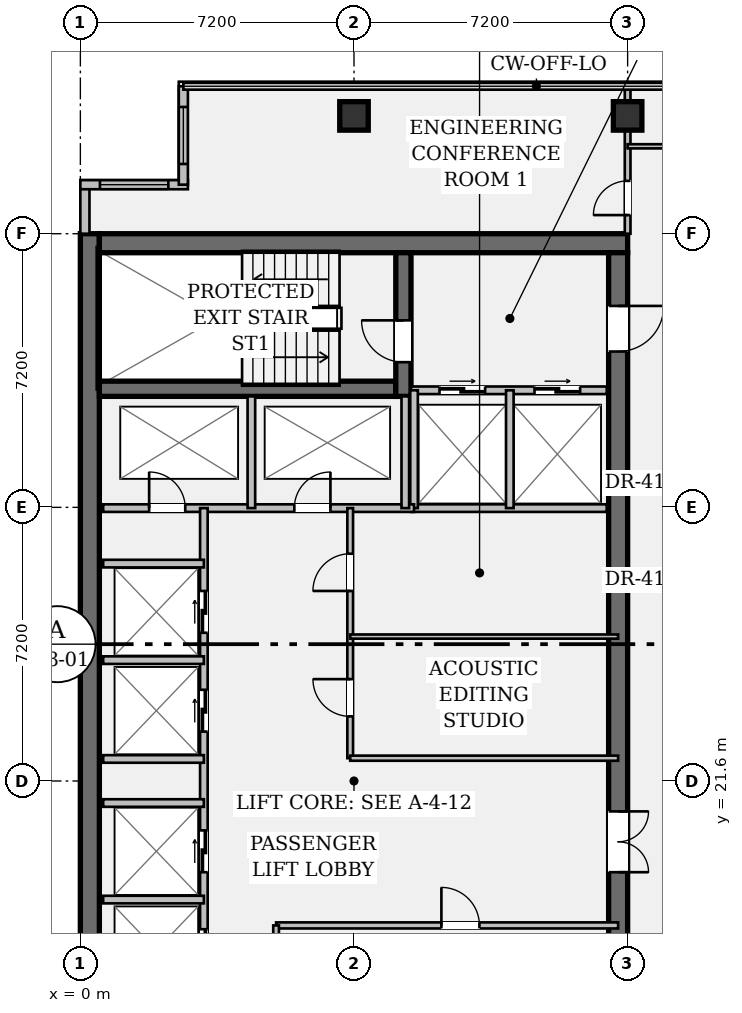
"""IFC4 building model, lengths in metres.
Left out: names, types, materials, properties, quantities, classifications, styles, units other than length and angle.
Written with IfcOpenShell. Run it as: python <this file> out.ifc"""

import sys

from ifc_helpers import new_model, si_unit, direction, frame, frame_2d, origin, origin_2d, place, context, subcontext, project, spatial, rectangle, hollow_rectangle, extrude, element, fill, save


model = new_model("IFC4")
c1 = context("Model", 3, precision=1e-05, world=origin(), true_north=direction((0.0, 1.0)))
c2 = subcontext(c1, "Body", "Model", "MODEL_VIEW")
j1 = project(units=[si_unit("LENGTHUNIT", "METRE"), si_unit("PLANEANGLEUNIT", "RADIAN")], contexts=[c1])
p1 = place(None, origin())
s1 = spatial("IfcSite", under=j1, at=p1, CompositionType="ELEMENT")
p2 = place(p1, origin())
s2 = spatial("IfcBuilding", under=s1, at=p2, CompositionType="ELEMENT")
p3 = place(p2, frame((0.0, 0.0, 204.75)))
s3 = spatial("IfcBuildingStorey", under=s2, at=p3, CompositionType="ELEMENT", Elevation=204.75)
p4 = place(p3, frame((0.25, 7.2, 0.0), z_axis=(0.0, 0.0, 1.0), x_axis=(0.0, 1.0, 0.0)))
e1 = element("IfcWall", 1, at=p4, inside=s3, PredefinedType="SHEAR", context=c2, shape_type="SweptSolid", body=[
    extrude(rectangle(XDim=28.8, YDim=0.5, at=frame_2d((14.4, 0.0))), origin(), (0.0, 0.0, 1.0), 3.24),
])
p5 = place(p3, frame((0.5, 35.75, 0.0), z_axis=(0.0, 0.0, 1.0), x_axis=(1.0, 0.0, 0.0)))
e2 = element("IfcWall", 2, at=p5, inside=s3, PredefinedType="SHEAR", context=c2, shape_type="SweptSolid", body=[
    extrude(rectangle(XDim=13.9, YDim=0.5, at=frame_2d((6.95, 0.0))), origin(), (0.0, 0.0, 1.0), 3.24),
])
p6 = place(p3, frame((14.15, 35.5, 0.0), z_axis=(0.0, 0.0, 1.0), x_axis=(0.0, -1.0, 0.0)))
e3 = element("IfcWall", 3, at=p6, inside=s3, PredefinedType="SHEAR", context=c2, shape_type="SweptSolid", body=[
    extrude(rectangle(XDim=27.8, YDim=0.5, at=frame_2d((13.9, 0.0))), origin(), (0.0, 0.0, 1.0), 3.24),
])
p7 = place(p6, frame((1.4, 0.0, 0.0)))
e4 = element("IfcOpeningElement", 4, at=p7, cuts=e3, PredefinedType="OPENING", context=c2, shape_type="SweptSolid", body=[
    extrude(rectangle(XDim=1.2, YDim=2.15, at=frame_2d((0.6, 1.075))), frame((0.0, 0.262, 0.0), z_axis=(0.0, -1.0, 0.0), x_axis=(1.0, 0.0, 0.0)), (0.0, 0.0, 1.0), 0.524),
])
p8 = place(p6, frame((25.35, 0.0, 0.0)))
e5 = element("IfcOpeningElement", 5, at=p8, cuts=e3, PredefinedType="OPENING", context=c2, shape_type="SweptSolid", body=[
    extrude(rectangle(XDim=1.2, YDim=2.15, at=frame_2d((0.6, 1.075))), frame((0.0, 0.262, 0.0), z_axis=(0.0, -1.0, 0.0), x_axis=(1.0, 0.0, 0.0)), (0.0, 0.0, 1.0), 0.524),
])
p9 = place(p6, frame((14.7, 0.0, 0.0)))
e6 = element("IfcOpeningElement", 6, at=p9, cuts=e3, PredefinedType="OPENING", context=c2, shape_type="SweptSolid", body=[
    extrude(rectangle(XDim=1.6, YDim=2.2, at=frame_2d((0.8, 1.1))), frame((0.0, 0.262, 0.0), z_axis=(0.0, -1.0, 0.0), x_axis=(1.0, 0.0, 0.0)), (0.0, 0.0, 1.0), 0.524),
])
p10 = place(p3, frame((0.5, 31.92, 0.0), z_axis=(0.0, 0.0, 1.0), x_axis=(1.0, 0.0, 0.0)))
e7 = element("IfcWall", 7, at=p10, inside=s3, PredefinedType="SHEAR", context=c2, shape_type="SweptSolid", body=[
    extrude(rectangle(XDim=7.8, YDim=0.4, at=frame_2d((3.9, 0.0))), origin(), (0.0, 0.0, 1.0), 3.24),
])
p11 = place(p3, frame((8.5, 31.72, 0.0), z_axis=(0.0, 0.0, 1.0), x_axis=(0.0, 1.0, 0.0)))
e8 = element("IfcWall", 8, at=p11, inside=s3, PredefinedType="SHEAR", context=c2, shape_type="SweptSolid", body=[
    extrude(rectangle(XDim=3.78, YDim=0.4, at=frame_2d((1.89, 0.0))), origin(), (0.0, 0.0, 1.0), 3.24),
])
p12 = place(p11, frame((0.9, 0.0, 0.0)))
e9 = element("IfcOpeningElement", 9, at=p12, cuts=e8, PredefinedType="OPENING", context=c2, shape_type="SweptSolid", body=[
    extrude(rectangle(XDim=1.1, YDim=2.15, at=frame_2d((0.55, 1.075))), frame((0.0, 0.212, 0.0), z_axis=(0.0, -1.0, 0.0), x_axis=(1.0, 0.0, 0.0)), (0.0, 0.0, 1.0), 0.424),
])
for number, where, z_axis, x_axis in (
    (10, (7.2, 39.1, 0.0), (0.0, 0.0, 1.0), (1.0, 0.0, 0.0)),
    (11, (14.4, 39.1, 0.0), (0.0, 0.0, 1.0), (1.0, 0.0, 0.0)),
):
    element("IfcColumn", number, at=place(p3, frame(where, z_axis=z_axis, x_axis=x_axis)), inside=s3, PredefinedType="COLUMN", context=c2, shape_type="SweptSolid", body=[
        extrude(hollow_rectangle(XDim=0.75, YDim=0.75, WallThickness=0.045, at=origin_2d()), origin(), (0.0, 0.0, 1.0), 3.24),
    ])
p13 = place(p3, frame((0.12, 36.0, 0.0), z_axis=(0.0, 0.0, 1.0), x_axis=(0.0, 1.0, 0.0)))
e12 = element("IfcWall", 12, at=p13, inside=s3, PredefinedType="STANDARD", context=c2, shape_type="SweptSolid", body=[
    extrude(rectangle(XDim=1.29, YDim=0.24, at=frame_2d((0.645, 0.0))), origin(), (0.0, 0.0, 1.0), 3.24),
])
p14 = place(p3, frame((0.0, 37.29, 0.0), z_axis=(0.0, 0.0, 1.0), x_axis=(1.0, 0.0, 0.0)))
e13 = element("IfcWall", 13, at=p14, inside=s3, PredefinedType="STANDARD", context=c2, shape_type="SweptSolid", body=[
    extrude(rectangle(XDim=2.83, YDim=0.24, at=frame_2d((1.415, 0.0))), origin(), (0.0, 0.0, 1.0), 3.24),
])
p15 = place(p14, frame((0.515, 0.0, 0.95)))
e14 = element("IfcOpeningElement", 14, at=p15, cuts=e13, PredefinedType="OPENING", context=c2, shape_type="SweptSolid", body=[
    extrude(rectangle(XDim=1.8, YDim=1.35, at=frame_2d((0.9, 0.675))), frame((0.0, 0.132, 0.0), z_axis=(0.0, -1.0, 0.0), x_axis=(1.0, 0.0, 0.0)), (0.0, 0.0, 1.0), 0.264),
])
p16 = place(p3, frame((2.71, 37.29, 0.0), z_axis=(0.0, 0.0, 1.0), x_axis=(0.0, 1.0, 0.0)))
e15 = element("IfcWall", 15, at=p16, inside=s3, PredefinedType="STANDARD", context=c2, shape_type="SweptSolid", body=[
    extrude(rectangle(XDim=2.59, YDim=0.24, at=frame_2d((1.295, 0.0))), origin(), (0.0, 0.0, 1.0), 3.24),
])
p17 = place(p16, frame((0.545, 0.0, 0.95)))
e16 = element("IfcOpeningElement", 16, at=p17, cuts=e15, PredefinedType="OPENING", context=c2, shape_type="SweptSolid", body=[
    extrude(rectangle(XDim=1.5, YDim=1.8, at=frame_2d((0.75, 0.9))), frame((0.0, 0.132, 0.0), z_axis=(0.0, -1.0, 0.0), x_axis=(1.0, 0.0, 0.0)), (0.0, 0.0, 1.0), 0.264),
])
p18 = place(p3, frame((8.7, 31.88, 0.0), z_axis=(0.0, 0.0, 1.0), x_axis=(1.0, 0.0, 0.0)))
e17 = element("IfcWall", 17, at=p18, inside=s3, PredefinedType="PARTITIONING", context=c2, shape_type="SweptSolid", body=[
    extrude(rectangle(XDim=5.15, YDim=0.2, at=frame_2d((2.575, 0.0))), origin(), (0.0, 0.0, 1.0), 3.24),
])
p19 = place(p18, frame((0.75, 0.0, 0.0)))
e18 = element("IfcOpeningElement", 18, at=p19, cuts=e17, PredefinedType="OPENING", context=c2, shape_type="SweptSolid", body=[
    extrude(rectangle(XDim=1.2, YDim=2.2, at=frame_2d((0.6, 1.1))), frame((0.0, 0.112, 0.0), z_axis=(0.0, -1.0, 0.0), x_axis=(1.0, 0.0, 0.0)), (0.0, 0.0, 1.0), 0.224),
])
p20 = place(p18, frame((3.25, 0.0, 0.0)))
e19 = element("IfcOpeningElement", 19, at=p20, cuts=e17, PredefinedType="OPENING", context=c2, shape_type="SweptSolid", body=[
    extrude(rectangle(XDim=1.2, YDim=2.2, at=frame_2d((0.6, 1.1))), frame((0.0, 0.112, 0.0), z_axis=(0.0, -1.0, 0.0), x_axis=(1.0, 0.0, 0.0)), (0.0, 0.0, 1.0), 0.224),
])
p21 = place(p3, frame((8.7, 28.78, 0.0), z_axis=(0.0, 0.0, 1.0), x_axis=(1.0, 0.0, 0.0)))
e20 = element("IfcWall", 20, at=p21, inside=s3, PredefinedType="PARTITIONING", context=c2, shape_type="SweptSolid", body=[
    extrude(rectangle(XDim=5.15, YDim=0.2, at=frame_2d((2.575, 0.0))), origin(), (0.0, 0.0, 1.0), 3.24),
])
for number, where, z_axis, x_axis in (
    (21, (8.78, 28.78, 0.0), (0.0, 0.0, 1.0), (0.0, 1.0, 0.0)),
    (22, (11.3, 28.78, 0.0), (0.0, 0.0, 1.0), (0.0, 1.0, 0.0)),
):
    element("IfcWall", number, at=place(p3, frame(where, z_axis=z_axis, x_axis=x_axis)), inside=s3, PredefinedType="PARTITIONING", context=c2, shape_type="SweptSolid", body=[
        extrude(rectangle(XDim=3.1, YDim=0.2, at=frame_2d((1.55, 0.0))), origin(), (0.0, 0.0, 1.0), 3.24),
    ])
p22 = place(p3, frame((0.6, 28.78, 0.0), z_axis=(0.0, 0.0, 1.0), x_axis=(1.0, 0.0, 0.0)))
e23 = element("IfcWall", 23, at=p22, inside=s3, PredefinedType="PARTITIONING", context=c2, shape_type="SweptSolid", body=[
    extrude(rectangle(XDim=8.18, YDim=0.2, at=frame_2d((4.09, 0.0))), origin(), (0.0, 0.0, 1.0), 3.24),
])
p23 = place(p22, frame((1.21, 0.0, 0.0)))
e24 = element("IfcOpeningElement", 24, at=p23, cuts=e23, PredefinedType="OPENING", context=c2, shape_type="SweptSolid", body=[
    extrude(rectangle(XDim=0.95, YDim=2.15, at=frame_2d((0.475, 1.075))), frame((0.0, 0.112, 0.0), z_axis=(0.0, -1.0, 0.0), x_axis=(1.0, 0.0, 0.0)), (0.0, 0.0, 1.0), 0.224),
])
p24 = place(p22, frame((5.03, 0.0, 0.0)))
e25 = element("IfcOpeningElement", 25, at=p24, cuts=e23, PredefinedType="OPENING", context=c2, shape_type="SweptSolid", body=[
    extrude(rectangle(XDim=0.95, YDim=2.15, at=frame_2d((0.475, 1.075))), frame((0.0, 0.112, 0.0), z_axis=(0.0, -1.0, 0.0), x_axis=(1.0, 0.0, 0.0)), (0.0, 0.0, 1.0), 0.224),
])
for number, where, z_axis, x_axis in (
    (26, (4.5, 28.78, 0.0), (0.0, 0.0, 1.0), (0.0, 1.0, 0.0)),
    (27, (8.55, 28.78, 0.0), (0.0, 0.0, 1.0), (0.0, 1.0, 0.0)),
):
    element("IfcWall", number, at=place(p3, frame(where, z_axis=z_axis, x_axis=x_axis)), inside=s3, PredefinedType="PARTITIONING", context=c2, shape_type="SweptSolid", body=[
        extrude(rectangle(XDim=2.94, YDim=0.2, at=frame_2d((1.47, 0.0))), origin(), (0.0, 0.0, 1.0), 3.24),
    ])
p25 = place(p3, frame((3.25, 15.7, 0.0), z_axis=(0.0, 0.0, 1.0), x_axis=(0.0, 1.0, 0.0)))
e28 = element("IfcWall", 28, at=p25, inside=s3, PredefinedType="PARTITIONING", context=c2, shape_type="SweptSolid", body=[
    extrude(rectangle(XDim=13.08, YDim=0.2, at=frame_2d((6.54, 0.0))), origin(), (0.0, 0.0, 1.0), 3.24),
])
p26 = place(p25, frame((0.9, 0.0, 0.0)))
e29 = element("IfcOpeningElement", 29, at=p26, cuts=e28, PredefinedType="OPENING", context=c2, shape_type="SweptSolid", body=[
    extrude(rectangle(XDim=1.1, YDim=2.2, at=frame_2d((0.55, 1.1))), frame((0.0, 0.112, 0.0), z_axis=(0.0, -1.0, 0.0), x_axis=(1.0, 0.0, 0.0)), (0.0, 0.0, 1.0), 0.224),
])
p27 = place(p25, frame((3.5, 0.0, 0.0)))
e30 = element("IfcOpeningElement", 30, at=p27, cuts=e28, PredefinedType="OPENING", context=c2, shape_type="SweptSolid", body=[
    extrude(rectangle(XDim=1.1, YDim=2.2, at=frame_2d((0.55, 1.1))), frame((0.0, 0.112, 0.0), z_axis=(0.0, -1.0, 0.0), x_axis=(1.0, 0.0, 0.0)), (0.0, 0.0, 1.0), 0.224),
])
p28 = place(p25, frame((7.2, 0.0, 0.0)))
e31 = element("IfcOpeningElement", 31, at=p28, cuts=e28, PredefinedType="OPENING", context=c2, shape_type="SweptSolid", body=[
    extrude(rectangle(XDim=1.1, YDim=2.2, at=frame_2d((0.55, 1.1))), frame((0.0, 0.112, 0.0), z_axis=(0.0, -1.0, 0.0), x_axis=(1.0, 0.0, 0.0)), (0.0, 0.0, 1.0), 0.224),
])
p29 = place(p25, frame((9.8, 0.0, 0.0)))
e32 = element("IfcOpeningElement", 32, at=p29, cuts=e28, PredefinedType="OPENING", context=c2, shape_type="SweptSolid", body=[
    extrude(rectangle(XDim=1.1, YDim=2.2, at=frame_2d((0.55, 1.1))), frame((0.0, 0.112, 0.0), z_axis=(0.0, -1.0, 0.0), x_axis=(1.0, 0.0, 0.0)), (0.0, 0.0, 1.0), 0.224),
])
for number, where, z_axis, x_axis in (
    (33, (0.6, 18.48, 0.0), (0.0, 0.0, 1.0), (1.0, 0.0, 0.0)),
    (34, (0.6, 22.18, 0.0), (0.0, 0.0, 1.0), (1.0, 0.0, 0.0)),
    (35, (0.6, 24.78, 0.0), (0.0, 0.0, 1.0), (1.0, 0.0, 0.0)),
    (36, (0.6, 21.02, 0.0), (0.0, 0.0, 1.0), (1.0, 0.0, 0.0)),
    (37, (0.6, 27.32, 0.0), (0.0, 0.0, 1.0), (1.0, 0.0, 0.0)),
):
    element("IfcWall", number, at=place(p3, frame(where, z_axis=z_axis, x_axis=x_axis)), inside=s3, PredefinedType="PARTITIONING", context=c2, shape_type="SweptSolid", body=[
        extrude(rectangle(XDim=2.65, YDim=0.2, at=frame_2d((1.325, 0.0))), origin(), (0.0, 0.0, 1.0), 3.24),
    ])
p30 = place(p3, frame((7.1, 22.2, 0.0), z_axis=(0.0, 0.0, 1.0), x_axis=(0.0, 1.0, 0.0)))
e38 = element("IfcWall", 38, at=p30, inside=s3, PredefinedType="PARTITIONING", context=c2, shape_type="SweptSolid", body=[
    extrude(rectangle(XDim=6.58, YDim=0.15, at=frame_2d((3.29, 0.0))), origin(), (0.0, 0.0, 1.0), 3.24),
])
p31 = place(p30, frame((1.1, 0.0, 0.0)))
e39 = element("IfcOpeningElement", 39, at=p31, cuts=e38, PredefinedType="OPENING", context=c2, shape_type="SweptSolid", body=[
    extrude(rectangle(XDim=0.98, YDim=2.15, at=frame_2d((0.49, 1.075))), frame((0.0, 0.087, 0.0), z_axis=(0.0, -1.0, 0.0), x_axis=(1.0, 0.0, 0.0)), (0.0, 0.0, 1.0), 0.174),
])
p32 = place(p30, frame((4.4, 0.0, 0.0)))
e40 = element("IfcOpeningElement", 40, at=p32, cuts=e38, PredefinedType="OPENING", context=c2, shape_type="SweptSolid", body=[
    extrude(rectangle(XDim=0.98, YDim=2.15, at=frame_2d((0.49, 1.075))), frame((0.0, 0.087, 0.0), z_axis=(0.0, -1.0, 0.0), x_axis=(1.0, 0.0, 0.0)), (0.0, 0.0, 1.0), 0.174),
])
p33 = place(p3, frame((7.1, 22.2, 0.0), z_axis=(0.0, 0.0, 1.0), x_axis=(1.0, 0.0, 0.0)))
e41 = element("IfcWall", 41, at=p33, inside=s3, PredefinedType="PARTITIONING", context=c2, shape_type="SweptSolid", body=[
    extrude(rectangle(XDim=7.05, YDim=0.135, at=frame_2d((3.525, 0.0))), origin(), (0.0, 0.0, 1.0), 3.24),
])
p34 = place(p3, frame((7.1, 25.4, 0.0), z_axis=(0.0, 0.0, 1.0), x_axis=(1.0, 0.0, 0.0)))
e42 = element("IfcWall", 42, at=p34, inside=s3, PredefinedType="PARTITIONING", context=c2, shape_type="SweptSolid", body=[
    extrude(rectangle(XDim=7.05, YDim=0.11, at=frame_2d((3.525, 0.0))), origin(), (0.0, 0.0, 1.0), 3.24),
])
p35 = place(p3, frame((5.15, 17.8, 0.0), z_axis=(0.0, 0.0, 1.0), x_axis=(1.0, 0.0, 0.0)))
e43 = element("IfcWall", 43, at=p35, inside=s3, PredefinedType="PARTITIONING", context=c2, shape_type="SweptSolid", body=[
    extrude(rectangle(XDim=9.0, YDim=0.16, at=frame_2d((4.5, 0.0))), origin(), (0.0, 0.0, 1.0), 3.24),
])
p36 = place(p35, frame((4.35, 0.0, 0.0)))
e44 = element("IfcOpeningElement", 44, at=p36, cuts=e43, PredefinedType="OPENING", context=c2, shape_type="SweptSolid", body=[
    extrude(rectangle(XDim=1.0, YDim=2.15, at=frame_2d((0.5, 1.075))), frame((0.0, 0.092, 0.0), z_axis=(0.0, -1.0, 0.0), x_axis=(1.0, 0.0, 0.0)), (0.0, 0.0, 1.0), 0.184),
])
p37 = place(p3, frame((5.15, 11.2, 0.0), z_axis=(0.0, 0.0, 1.0), x_axis=(0.0, 1.0, 0.0)))
e45 = element("IfcWall", 45, at=p37, inside=s3, PredefinedType="PARTITIONING", context=c2, shape_type="SweptSolid", body=[
    extrude(rectangle(XDim=6.6, YDim=0.15, at=frame_2d((3.3, 0.0))), origin(), (0.0, 0.0, 1.0), 3.24),
])
p38 = place(p3, frame((14.4, 36.0, 0.0), z_axis=(0.0, 0.0, 1.0), x_axis=(0.0, 1.0, 0.0)))
e46 = element("IfcWall", 46, at=p38, inside=s3, PredefinedType="PARTITIONING", context=c2, shape_type="SweptSolid", body=[
    extrude(rectangle(XDim=3.88, YDim=0.15, at=frame_2d((1.94, 0.0))), origin(), (0.0, 0.0, 1.0), 2.613),
])
p39 = place(p38, frame((0.49, 0.0, 0.0)))
e47 = element("IfcOpeningElement", 47, at=p39, cuts=e46, PredefinedType="OPENING", context=c2, shape_type="SweptSolid", body=[
    extrude(rectangle(XDim=0.9, YDim=2.15, at=frame_2d((0.45, 1.075))), frame((0.0, 0.087, 0.0), z_axis=(0.0, -1.0, 0.0), x_axis=(1.0, 0.0, 0.0)), (0.0, 0.0, 1.0), 0.174),
])
p40 = place(p3, frame((14.4, 38.3, 0.0), z_axis=(0.0, 0.0, 1.0), x_axis=(1.0, 0.0, 0.0)))
e48 = element("IfcWall", 48, at=p40, inside=s3, PredefinedType="PARTITIONING", context=c2, shape_type="SweptSolid", body=[
    extrude(rectangle(XDim=2.95, YDim=0.11, at=frame_2d((1.475, 0.0))), origin(), (0.0, 0.0, 1.0), 3.24),
])
p41 = place(p40, frame((1.54, 0.0, 0.0)))
e49 = element("IfcOpeningElement", 49, at=p41, cuts=e48, PredefinedType="OPENING", context=c2, shape_type="SweptSolid", body=[
    extrude(rectangle(XDim=0.98, YDim=2.15, at=frame_2d((0.49, 1.075))), frame((0.0, 0.067, 0.0), z_axis=(0.0, -1.0, 0.0), x_axis=(1.0, 0.0, 0.0)), (0.0, 0.0, 1.0), 0.134),
])
p42 = place(p15, origin())
e50 = element("IfcWindow", 50, at=p42, inside=s3, PartitioningType="SINGLE_PANEL", PredefinedType="WINDOW", context=c2, shape_type="SweptSolid", body=[
    extrude(rectangle(XDim=1.8, YDim=1.35, at=frame_2d((0.9, 0.675))), frame((0.0, 0.03, 0.0), z_axis=(0.0, -1.0, 0.0), x_axis=(1.0, 0.0, 0.0)), (0.0, 0.0, 1.0), 0.06),
])
fill(e14, e50)
p43 = place(p17, origin())
e51 = element("IfcWindow", 51, at=p43, inside=s3, PartitioningType="SINGLE_PANEL", PredefinedType="WINDOW", context=c2, shape_type="SweptSolid", body=[
    extrude(rectangle(XDim=1.5, YDim=1.8, at=frame_2d((0.75, 0.9))), frame((0.0, 0.03, 0.0), z_axis=(0.0, -1.0, 0.0), x_axis=(1.0, 0.0, 0.0)), (0.0, 0.0, 1.0), 0.06),
])
fill(e16, e51)
p44 = place(p12, origin())
e52 = element("IfcDoor", 52, at=p44, inside=s3, OperationType="SINGLE_SWING_RIGHT", PredefinedType="DOOR", context=c2, shape_type="SweptSolid", body=[
    extrude(rectangle(XDim=1.1, YDim=2.15, at=frame_2d((0.55, 1.075))), frame((0.0, 0.025, 0.0), z_axis=(0.0, -1.0, 0.0), x_axis=(1.0, 0.0, 0.0)), (0.0, 0.0, 1.0), 0.05),
])
fill(e9, e52)
p45 = place(p7, origin())
e53 = element("IfcDoor", 53, at=p45, inside=s3, OperationType="SINGLE_SWING_LEFT", PredefinedType="DOOR", context=c2, shape_type="SweptSolid", body=[
    extrude(rectangle(XDim=1.2, YDim=2.15, at=frame_2d((0.6, 1.075))), frame((0.0, 0.025, 0.0), z_axis=(0.0, -1.0, 0.0), x_axis=(1.0, 0.0, 0.0)), (0.0, 0.0, 1.0), 0.05),
])
fill(e4, e53)
p46 = place(p19, origin())
e54 = element("IfcDoor", 54, at=p46, inside=s3, OperationType="DOUBLE_DOOR_SLIDING", PredefinedType="DOOR", context=c2, shape_type="SweptSolid", body=[
    extrude(rectangle(XDim=1.2, YDim=2.2, at=frame_2d((0.6, 1.1))), frame((0.0, 0.025, 0.0), z_axis=(0.0, -1.0, 0.0), x_axis=(1.0, 0.0, 0.0)), (0.0, 0.0, 1.0), 0.05),
])
fill(e18, e54)
p47 = place(p20, origin())
e55 = element("IfcDoor", 55, at=p47, inside=s3, OperationType="DOUBLE_DOOR_SLIDING", PredefinedType="DOOR", context=c2, shape_type="SweptSolid", body=[
    extrude(rectangle(XDim=1.2, YDim=2.2, at=frame_2d((0.6, 1.1))), frame((0.0, 0.025, 0.0), z_axis=(0.0, -1.0, 0.0), x_axis=(1.0, 0.0, 0.0)), (0.0, 0.0, 1.0), 0.05),
])
fill(e19, e55)
p48 = place(p23, origin())
e56 = element("IfcDoor", 56, at=p48, inside=s3, OperationType="SINGLE_SWING_LEFT", PredefinedType="DOOR", context=c2, shape_type="SweptSolid", body=[
    extrude(rectangle(XDim=0.95, YDim=2.15, at=frame_2d((0.475, 1.075))), frame((0.0, 0.025, 0.0), z_axis=(0.0, -1.0, 0.0), x_axis=(1.0, 0.0, 0.0)), (0.0, 0.0, 1.0), 0.05),
])
fill(e24, e56)
p49 = place(p24, origin())
e57 = element("IfcDoor", 57, at=p49, inside=s3, OperationType="SINGLE_SWING_RIGHT", PredefinedType="DOOR", context=c2, shape_type="SweptSolid", body=[
    extrude(rectangle(XDim=0.95, YDim=2.15, at=frame_2d((0.475, 1.075))), frame((0.0, 0.025, 0.0), z_axis=(0.0, -1.0, 0.0), x_axis=(1.0, 0.0, 0.0)), (0.0, 0.0, 1.0), 0.05),
])
fill(e25, e57)
p50 = place(p9, origin())
e58 = element("IfcDoor", 58, at=p50, inside=s3, OperationType="DOUBLE_DOOR_SINGLE_SWING", PredefinedType="DOOR", context=c2, shape_type="SweptSolid", body=[
    extrude(rectangle(XDim=1.6, YDim=2.2, at=frame_2d((0.8, 1.1))), frame((0.0, 0.025, 0.0), z_axis=(0.0, -1.0, 0.0), x_axis=(1.0, 0.0, 0.0)), (0.0, 0.0, 1.0), 0.05),
])
fill(e6, e58)
p51 = place(p26, origin())
e59 = element("IfcDoor", 59, at=p51, inside=s3, OperationType="DOUBLE_DOOR_SLIDING", PredefinedType="DOOR", context=c2, shape_type="SweptSolid", body=[
    extrude(rectangle(XDim=1.1, YDim=2.2, at=frame_2d((0.55, 1.1))), frame((0.0, 0.025, 0.0), z_axis=(0.0, -1.0, 0.0), x_axis=(1.0, 0.0, 0.0)), (0.0, 0.0, 1.0), 0.05),
])
fill(e29, e59)
p52 = place(p27, origin())
e60 = element("IfcDoor", 60, at=p52, inside=s3, OperationType="DOUBLE_DOOR_SLIDING", PredefinedType="DOOR", context=c2, shape_type="SweptSolid", body=[
    extrude(rectangle(XDim=1.1, YDim=2.2, at=frame_2d((0.55, 1.1))), frame((0.0, 0.025, 0.0), z_axis=(0.0, -1.0, 0.0), x_axis=(1.0, 0.0, 0.0)), (0.0, 0.0, 1.0), 0.05),
])
fill(e30, e60)
p53 = place(p28, origin())
e61 = element("IfcDoor", 61, at=p53, inside=s3, OperationType="DOUBLE_DOOR_SLIDING", PredefinedType="DOOR", context=c2, shape_type="SweptSolid", body=[
    extrude(rectangle(XDim=1.1, YDim=2.2, at=frame_2d((0.55, 1.1))), frame((0.0, 0.025, 0.0), z_axis=(0.0, -1.0, 0.0), x_axis=(1.0, 0.0, 0.0)), (0.0, 0.0, 1.0), 0.05),
])
fill(e31, e61)
p54 = place(p29, origin())
e62 = element("IfcDoor", 62, at=p54, inside=s3, OperationType="DOUBLE_DOOR_SLIDING", PredefinedType="DOOR", context=c2, shape_type="SweptSolid", body=[
    extrude(rectangle(XDim=1.1, YDim=2.2, at=frame_2d((0.55, 1.1))), frame((0.0, 0.025, 0.0), z_axis=(0.0, -1.0, 0.0), x_axis=(1.0, 0.0, 0.0)), (0.0, 0.0, 1.0), 0.05),
])
fill(e32, e62)
p55 = place(p31, origin())
e63 = element("IfcDoor", 63, at=p55, inside=s3, OperationType="SINGLE_SWING_RIGHT", PredefinedType="DOOR", context=c2, shape_type="SweptSolid", body=[
    extrude(rectangle(XDim=0.98, YDim=2.15, at=frame_2d((0.49, 1.075))), frame((0.0, 0.025, 0.0), z_axis=(0.0, -1.0, 0.0), x_axis=(1.0, 0.0, 0.0)), (0.0, 0.0, 1.0), 0.05),
])
fill(e39, e63)
p56 = place(p32, origin())
e64 = element("IfcDoor", 64, at=p56, inside=s3, OperationType="SINGLE_SWING_LEFT", PredefinedType="DOOR", context=c2, shape_type="SweptSolid", body=[
    extrude(rectangle(XDim=0.98, YDim=2.15, at=frame_2d((0.49, 1.075))), frame((0.0, 0.025, 0.0), z_axis=(0.0, -1.0, 0.0), x_axis=(1.0, 0.0, 0.0)), (0.0, 0.0, 1.0), 0.05),
])
fill(e40, e64)
p57 = place(p36, origin())
e65 = element("IfcDoor", 65, at=p57, inside=s3, OperationType="SINGLE_SWING_LEFT", PredefinedType="DOOR", context=c2, shape_type="SweptSolid", body=[
    extrude(rectangle(XDim=1.0, YDim=2.15, at=frame_2d((0.5, 1.075))), frame((0.0, 0.025, 0.0), z_axis=(0.0, -1.0, 0.0), x_axis=(1.0, 0.0, 0.0)), (0.0, 0.0, 1.0), 0.05),
])
fill(e44, e65)
p58 = place(p39, origin())
e66 = element("IfcDoor", 66, at=p58, inside=s3, OperationType="SINGLE_SWING_LEFT", PredefinedType="DOOR", context=c2, shape_type="SweptSolid", body=[
    extrude(rectangle(XDim=0.9, YDim=2.15, at=frame_2d((0.45, 1.075))), frame((0.0, 0.025, 0.0), z_axis=(0.0, -1.0, 0.0), x_axis=(1.0, 0.0, 0.0)), (0.0, 0.0, 1.0), 0.05),
])
fill(e47, e66)
save(model, sys.argv[1])
